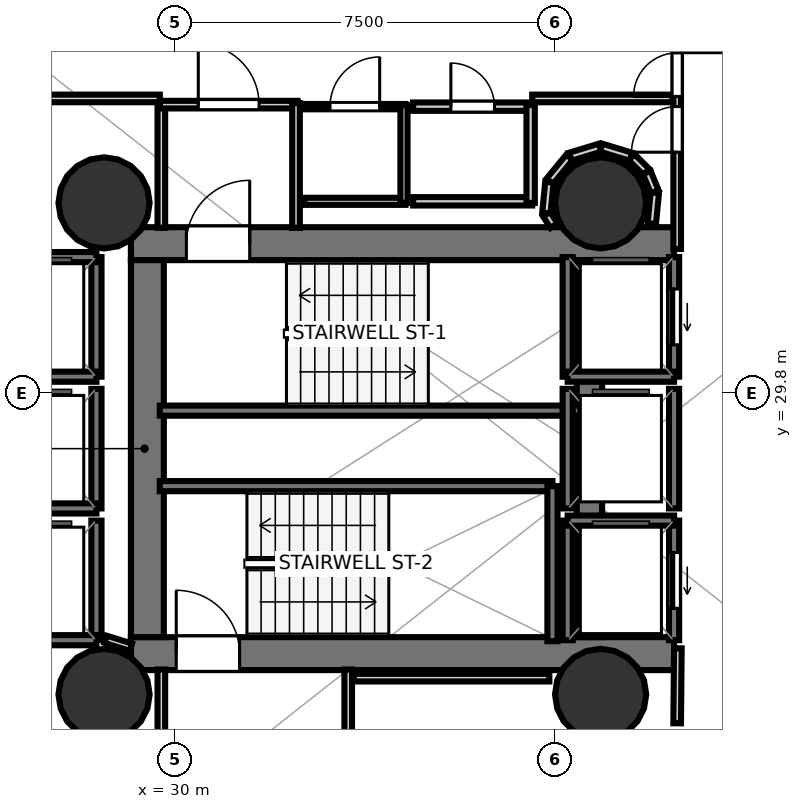
"""IFC4 building model, lengths in metres.
Left out: names, types, materials, properties, quantities, classifications, styles, units other than length and angle.
Written with IfcOpenShell. Run it as: python <this file> out.ifc"""

import sys

from ifc_helpers import new_model, si_unit, direction, frame, frame_2d, origin, origin_2d, place, context, subcontext, project, spatial, rectangle, hollow_circle, extrude, element, fill, save


model = new_model("IFC4")
c1 = context("Model", 3, precision=1e-05, world=origin(), true_north=direction((0.0, 1.0)))
c2 = subcontext(c1, "Body", "Model", "MODEL_VIEW")
j1 = project(units=[si_unit("LENGTHUNIT", "METRE"), si_unit("PLANEANGLEUNIT", "RADIAN")], contexts=[c1])
p1 = place(None, origin())
s1 = spatial("IfcSite", under=j1, at=p1, CompositionType="ELEMENT")
p2 = place(p1, origin())
s2 = spatial("IfcBuilding", under=s1, at=p2, CompositionType="ELEMENT")
p3 = place(p2, frame((0.0, 0.0, 25.7)))
s3 = spatial("IfcBuildingStorey", under=s2, at=p3, CompositionType="ELEMENT", Elevation=25.7)
p4 = place(p3, frame((29.13, 32.745, 0.0), z_axis=(0.0, 0.0, 1.0), x_axis=(1.0, 0.0, 0.0)))
e1 = element("IfcWall", 1, at=p4, inside=s3, PredefinedType="SHEAR", context=c2, shape_type="SweptSolid", body=[
    extrude(rectangle(XDim=10.72, YDim=0.65, at=frame_2d((5.36, 0.0))), origin(), (0.0, 0.0, 1.0), 3.52),
])
p5 = place(p4, frame((1.095, 0.0, 0.0)))
e2 = element("IfcOpeningElement", 2, at=p5, cuts=e1, PredefinedType="OPENING", context=c2, shape_type="SweptSolid", body=[
    extrude(rectangle(XDim=1.25, YDim=2.15, at=frame_2d((0.625, 1.075))), frame((0.0, 0.335, 0.0), z_axis=(0.0, -1.0, 0.0), x_axis=(1.0, 0.0, 0.0)), (0.0, 0.0, 1.0), 0.67),
])
p6 = place(p3, frame((29.13, 24.655, 0.0), z_axis=(0.0, 0.0, 1.0), x_axis=(1.0, 0.0, 0.0)))
e3 = element("IfcWall", 3, at=p6, inside=s3, PredefinedType="SHEAR", context=c2, shape_type="SweptSolid", body=[
    extrude(rectangle(XDim=10.72, YDim=0.65, at=frame_2d((5.36, 0.0))), origin(), (0.0, 0.0, 1.0), 3.52),
])
p7 = place(p6, frame((0.895, 0.0, 0.0)))
e4 = element("IfcOpeningElement", 4, at=p7, cuts=e3, PredefinedType="OPENING", context=c2, shape_type="SweptSolid", body=[
    extrude(rectangle(XDim=1.25, YDim=2.15, at=frame_2d((0.625, 1.075))), frame((0.0, 0.335, 0.0), z_axis=(0.0, -1.0, 0.0), x_axis=(1.0, 0.0, 0.0)), (0.0, 0.0, 1.0), 0.67),
])
p8 = place(p3, frame((29.455, 24.98, 0.0), z_axis=(0.0, 0.0, 1.0), x_axis=(0.0, 1.0, 0.0)))
e5 = element("IfcWall", 5, at=p8, inside=s3, PredefinedType="SHEAR", context=c2, shape_type="SweptSolid", body=[
    extrude(rectangle(XDim=7.44, YDim=0.65, at=frame_2d((3.72, 0.0))), origin(), (0.0, 0.0, 1.0), 3.52),
])
p9 = place(p3, frame((38.18, 24.98, 0.0), z_axis=(0.0, 0.0, 1.0), x_axis=(0.0, 1.0, 0.0)))
e6 = element("IfcWall", 6, at=p9, inside=s3, PredefinedType="SHEAR", context=c2, shape_type="SweptSolid", body=[
    extrude(rectangle(XDim=7.44, YDim=0.5, at=frame_2d((3.72, 0.0))), origin(), (0.0, 0.0, 1.0), 3.52),
])
for number, where, z_axis, x_axis in (
    (7, (28.6, 33.55, 0.0), (0.0, 0.0, 1.0), (1.0, 0.0, 0.0)),
    (8, (28.6, 23.85, 0.0), (0.0, 0.0, 1.0), (1.0, 0.0, 0.0)),
    (9, (38.4, 33.55, 0.0), (0.0, 0.0, 1.0), (1.0, 0.0, 0.0)),
    (10, (38.4, 23.85, 0.0), (0.0, 0.0, 1.0), (1.0, 0.0, 0.0)),
):
    element("IfcColumn", number, at=place(p3, frame(where, z_axis=z_axis, x_axis=x_axis)), inside=s3, PredefinedType="COLUMN", context=c2, shape_type="SweptSolid", body=[
        extrude(hollow_circle(Radius=0.9, WallThickness=0.045, at=origin_2d()), origin(), (0.0, 0.0, 1.0), 3.7),
    ])
p10 = place(p3, frame((29.7, 29.45, 0.0), z_axis=(0.0, 0.0, 1.0), x_axis=(1.0, 0.0, 0.0)))
e11 = element("IfcWall", 11, at=p10, inside=s3, PredefinedType="SOLIDWALL", context=c2, shape_type="SweptSolid", body=[
    extrude(rectangle(XDim=8.3, YDim=0.2, at=frame_2d((4.15, 0.0))), origin(), (0.0, 0.0, 1.0), 3.52),
])
p11 = place(p3, frame((29.7, 27.96, 0.0), z_axis=(0.0, 0.0, 1.0), x_axis=(1.0, 0.0, 0.0)))
e12 = element("IfcWall", 12, at=p11, inside=s3, PredefinedType="SOLIDWALL", context=c2, shape_type="SweptSolid", body=[
    extrude(rectangle(XDim=7.75, YDim=0.2, at=frame_2d((3.875, 0.0))), origin(), (0.0, 0.0, 1.0), 3.52),
])
p12 = place(p3, frame((37.45, 24.9, 0.0), z_axis=(0.0, 0.0, 1.0), x_axis=(0.0, 1.0, 0.0)))
e13 = element("IfcWall", 13, at=p12, inside=s3, PredefinedType="SOLIDWALL", context=c2, shape_type="SweptSolid", body=[
    extrude(rectangle(XDim=3.06, YDim=0.2, at=frame_2d((1.53, 0.0))), origin(), (0.0, 0.0, 1.0), 3.52),
])
p13 = place(p3, frame((39.85, 30.12, 0.0), z_axis=(0.0, 0.0, 1.0), x_axis=(0.0, 1.0, 0.0)))
e14 = element("IfcWall", 14, at=p13, inside=s3, PredefinedType="SOLIDWALL", context=c2, shape_type="SweptSolid", body=[
    extrude(rectangle(XDim=2.36, YDim=0.2, at=frame_2d((1.18, 0.0))), origin(), (0.0, 0.0, 1.0), 3.52),
])
p14 = place(p13, frame((0.63, 0.0, 0.0)))
e15 = element("IfcOpeningElement", 15, at=p14, cuts=e14, PredefinedType="OPENING", context=c2, shape_type="SweptSolid", body=[
    extrude(rectangle(XDim=1.1, YDim=2.15, at=frame_2d((0.55, 1.075))), frame((0.0, 0.11, 0.0), z_axis=(0.0, -1.0, 0.0), x_axis=(1.0, 0.0, 0.0)), (0.0, 0.0, 1.0), 0.22),
])
p15 = place(p3, frame((37.75, 30.12, 0.0), z_axis=(0.0, 0.0, 1.0), x_axis=(0.0, 1.0, 0.0)))
e16 = element("IfcWall", 16, at=p15, inside=s3, PredefinedType="SOLIDWALL", context=c2, shape_type="SweptSolid", body=[
    extrude(rectangle(XDim=2.36, YDim=0.2, at=frame_2d((1.18, 0.0))), origin(), (0.0, 0.0, 1.0), 3.52),
])
p16 = place(p3, frame((37.75, 30.12, 0.0), z_axis=(0.0, 0.0, 1.0), x_axis=(1.0, 0.0, 0.0)))
e17 = element("IfcWall", 17, at=p16, inside=s3, PredefinedType="SOLIDWALL", context=c2, shape_type="SweptSolid", body=[
    extrude(rectangle(XDim=2.1, YDim=0.2, at=frame_2d((1.05, 0.0))), origin(), (0.0, 0.0, 1.0), 3.52),
])
p17 = place(p3, frame((39.85, 24.92, 0.0), z_axis=(0.0, 0.0, 1.0), x_axis=(0.0, 1.0, 0.0)))
e18 = element("IfcWall", 18, at=p17, inside=s3, PredefinedType="SOLIDWALL", context=c2, shape_type="SweptSolid", body=[
    extrude(rectangle(XDim=2.36, YDim=0.2, at=frame_2d((1.18, 0.0))), origin(), (0.0, 0.0, 1.0), 3.52),
])
p18 = place(p17, frame((0.63, 0.0, 0.0)))
e19 = element("IfcOpeningElement", 19, at=p18, cuts=e18, PredefinedType="OPENING", context=c2, shape_type="SweptSolid", body=[
    extrude(rectangle(XDim=1.1, YDim=2.15, at=frame_2d((0.55, 1.075))), frame((0.0, 0.11, 0.0), z_axis=(0.0, -1.0, 0.0), x_axis=(1.0, 0.0, 0.0)), (0.0, 0.0, 1.0), 0.22),
])
p19 = place(p3, frame((37.75, 24.92, 0.0), z_axis=(0.0, 0.0, 1.0), x_axis=(0.0, 1.0, 0.0)))
e20 = element("IfcWall", 20, at=p19, inside=s3, PredefinedType="SOLIDWALL", context=c2, shape_type="SweptSolid", body=[
    extrude(rectangle(XDim=2.36, YDim=0.2, at=frame_2d((1.18, 0.0))), origin(), (0.0, 0.0, 1.0), 3.52),
])
p20 = place(p3, frame((37.75, 27.28, 0.0), z_axis=(0.0, 0.0, 1.0), x_axis=(1.0, 0.0, 0.0)))
e21 = element("IfcWall", 21, at=p20, inside=s3, PredefinedType="SOLIDWALL", context=c2, shape_type="SweptSolid", body=[
    extrude(rectangle(XDim=2.1, YDim=0.2, at=frame_2d((1.05, 0.0))), origin(), (0.0, 0.0, 1.0), 3.52),
])
p21 = place(p3, frame((28.45, 30.12, 0.0), z_axis=(0.0, 0.0, 1.0), x_axis=(0.0, 1.0, 0.0)))
e22 = element("IfcWall", 22, at=p21, inside=s3, PredefinedType="SOLIDWALL", context=c2, shape_type="SweptSolid", body=[
    extrude(rectangle(XDim=2.36, YDim=0.2, at=frame_2d((1.18, 0.0))), origin(), (0.0, 0.0, 1.0), 3.52),
])
for number, where, z_axis, x_axis in (
    (23, (26.35, 32.48, 0.0), (0.0, 0.0, 1.0), (1.0, 0.0, 0.0)),
    (24, (26.35, 30.12, 0.0), (0.0, 0.0, 1.0), (1.0, 0.0, 0.0)),
):
    element("IfcWall", number, at=place(p3, frame(where, z_axis=z_axis, x_axis=x_axis)), inside=s3, PredefinedType="SOLIDWALL", context=c2, shape_type="SweptSolid", body=[
        extrude(rectangle(XDim=2.1, YDim=0.2, at=frame_2d((1.05, 0.0))), origin(), (0.0, 0.0, 1.0), 3.52),
    ])
p22 = place(p3, frame((28.45, 27.52, 0.0), z_axis=(0.0, 0.0, 1.0), x_axis=(0.0, 1.0, 0.0)))
e25 = element("IfcWall", 25, at=p22, inside=s3, PredefinedType="SOLIDWALL", context=c2, shape_type="SweptSolid", body=[
    extrude(rectangle(XDim=2.36, YDim=0.2, at=frame_2d((1.18, 0.0))), origin(), (0.0, 0.0, 1.0), 3.52),
])
p23 = place(p3, frame((26.35, 27.52, 0.0), z_axis=(0.0, 0.0, 1.0), x_axis=(1.0, 0.0, 0.0)))
e26 = element("IfcWall", 26, at=p23, inside=s3, PredefinedType="SOLIDWALL", context=c2, shape_type="SweptSolid", body=[
    extrude(rectangle(XDim=2.1, YDim=0.2, at=frame_2d((1.05, 0.0))), origin(), (0.0, 0.0, 1.0), 3.52),
])
p24 = place(p3, frame((28.45, 24.92, 0.0), z_axis=(0.0, 0.0, 1.0), x_axis=(0.0, 1.0, 0.0)))
e27 = element("IfcWall", 27, at=p24, inside=s3, PredefinedType="SOLIDWALL", context=c2, shape_type="SweptSolid", body=[
    extrude(rectangle(XDim=2.36, YDim=0.2, at=frame_2d((1.18, 0.0))), origin(), (0.0, 0.0, 1.0), 3.52),
])
p25 = place(p3, frame((26.35, 24.92, 0.0), z_axis=(0.0, 0.0, 1.0), x_axis=(1.0, 0.0, 0.0)))
e28 = element("IfcWall", 28, at=p25, inside=s3, PredefinedType="SOLIDWALL", context=c2, shape_type="SweptSolid", body=[
    extrude(rectangle(XDim=2.1, YDim=0.2, at=frame_2d((1.05, 0.0))), origin(), (0.0, 0.0, 1.0), 3.52),
])
for number, where, z_axis, x_axis in (
    (29, (39.85, 27.52, 0.0), (0.0, 0.0, 1.0), (0.0, 1.0, 0.0)),
    (30, (37.75, 27.52, 0.0), (0.0, 0.0, 1.0), (0.0, 1.0, 0.0)),
):
    element("IfcWall", number, at=place(p3, frame(where, z_axis=z_axis, x_axis=x_axis)), inside=s3, PredefinedType="SOLIDWALL", context=c2, shape_type="SweptSolid", body=[
        extrude(rectangle(XDim=2.36, YDim=0.2, at=frame_2d((1.18, 0.0))), origin(), (0.0, 0.0, 1.0), 3.52),
    ])
p26 = place(p3, frame((29.731, 33.058, 0.0), z_axis=(0.0, 0.0, 1.0), x_axis=(0.0, 1.0, 0.0)))
e31 = element("IfcWall", 31, at=p26, inside=s3, PredefinedType="PARTITIONING", context=c2, shape_type="SweptSolid", body=[
    extrude(rectangle(XDim=2.462, YDim=0.15, at=frame_2d((1.231, 0.0))), origin(), (0.0, 0.0, 1.0), 2.84),
])
p27 = place(p3, frame((29.7, 35.489, 0.0), z_axis=(0.0, 0.0, 1.0), x_axis=(1.0, 0.0, 0.0)))
e32 = element("IfcWall", 32, at=p27, inside=s3, PredefinedType="PARTITIONING", context=c2, shape_type="SweptSolid", body=[
    extrude(rectangle(XDim=2.72, YDim=0.15, at=frame_2d((1.36, 0.0))), origin(), (0.0, 0.0, 1.0), 2.84),
])
p28 = place(p27, frame((0.76, 0.0, 0.0)))
e33 = element("IfcOpeningElement", 33, at=p28, cuts=e32, PredefinedType="OPENING", context=c2, shape_type="SweptSolid", body=[
    extrude(rectangle(XDim=1.2, YDim=2.15, at=frame_2d((0.6, 1.075))), frame((0.0, 0.085, 0.0), z_axis=(0.0, -1.0, 0.0), x_axis=(1.0, 0.0, 0.0)), (0.0, 0.0, 1.0), 0.17),
])
p29 = place(p3, frame((32.389, 35.52, 0.0), z_axis=(0.0, 0.0, 1.0), x_axis=(0.0, -1.0, 0.0)))
e34 = element("IfcWall", 34, at=p29, inside=s3, PredefinedType="PARTITIONING", context=c2, shape_type="SweptSolid", body=[
    extrude(rectangle(XDim=2.462, YDim=0.15, at=frame_2d((1.231, 0.0))), origin(), (0.0, 0.0, 1.0), 2.84),
])
for number, where, z_axis, x_axis in (
    (35, (29.731, 21.85, 0.0), (0.0, 0.0, 1.0), (0.0, 1.0, 0.0)),
    (36, (33.419, 24.342, 0.0), (0.0, 0.0, 1.0), (0.0, -1.0, 0.0)),
):
    element("IfcWall", number, at=place(p3, frame(where, z_axis=z_axis, x_axis=x_axis)), inside=s3, PredefinedType="PARTITIONING", context=c2, shape_type="SweptSolid", body=[
        extrude(rectangle(XDim=2.492, YDim=0.15, at=frame_2d((1.246, 0.0))), origin(), (0.0, 0.0, 1.0), 2.84),
    ])
p30 = place(p3, frame((39.911, 32.64, 0.0), z_axis=(0.0, 0.0, 1.0), x_axis=(0.0, 1.0, 0.0)))
e37 = element("IfcWall", 37, at=p30, inside=s3, PredefinedType="PARTITIONING", context=c2, shape_type="SweptSolid", body=[
    extrude(rectangle(XDim=4.01, YDim=0.15, at=frame_2d((2.005, 0.0))), origin(), (0.0, 0.0, 1.0), 2.84),
])
p31 = place(p30, frame((3.01, 0.0, 0.0)))
e38 = element("IfcOpeningElement", 38, at=p31, cuts=e37, PredefinedType="OPENING", context=c2, shape_type="SweptSolid", body=[
    extrude(rectangle(XDim=0.86, YDim=2.05, at=frame_2d((0.43, 1.025))), frame((0.0, 0.085, 0.0), z_axis=(0.0, -1.0, 0.0), x_axis=(1.0, 0.0, 0.0)), (0.0, 0.0, 1.0), 0.17),
])
p32 = place(p30, frame((1.91, 0.0, 0.0)))
e39 = element("IfcOpeningElement", 39, at=p32, cuts=e37, PredefinedType="OPENING", context=c2, shape_type="SweptSolid", body=[
    extrude(rectangle(XDim=0.9, YDim=2.1, at=frame_2d((0.45, 1.05))), frame((0.0, 0.085, 0.0), z_axis=(0.0, -1.0, 0.0), x_axis=(1.0, 0.0, 0.0)), (0.0, 0.0, 1.0), 0.17),
])
p33 = place(p3, frame((39.911, 23.28, 0.0), z_axis=(0.0, 0.0, 1.0), x_axis=(0.009397771291, 0.999955839972, 0.0)))
e40 = element("IfcWall", 40, at=p33, inside=s3, PredefinedType="PARTITIONING", context=c2, shape_type="SweptSolid", body=[
    extrude(rectangle(XDim=1.481, YDim=0.15, at=frame_2d((0.74, 0.0))), origin(), (0.0, 0.0, 1.0), 2.84),
])
p34 = place(p3, frame((34.55, 33.581, 0.0), z_axis=(0.0, 0.0, 1.0), x_axis=(-1.0, 0.0, 0.0)))
e41 = element("IfcWall", 41, at=p34, inside=s3, PredefinedType="PARTITIONING", context=c2, shape_type="SweptSolid", body=[
    extrude(rectangle(XDim=2.0, YDim=0.14, at=frame_2d((1.0, 0.0))), origin(), (0.0, 0.0, 1.0), 2.84),
])
p35 = place(p3, frame((32.55, 35.449, 0.0), z_axis=(0.0, 0.0, 1.0), x_axis=(1.0, 0.0, 0.0)))
e42 = element("IfcWall", 42, at=p35, inside=s3, PredefinedType="PARTITIONING", context=c2, shape_type="SweptSolid", body=[
    extrude(rectangle(XDim=2.0, YDim=0.105, at=frame_2d((1.0, 0.0))), origin(), (0.0, 0.0, 1.0), 2.84),
])
p36 = place(p35, frame((0.51, 0.0, 0.0)))
e43 = element("IfcOpeningElement", 43, at=p36, cuts=e42, PredefinedType="OPENING", context=c2, shape_type="SweptSolid", body=[
    extrude(rectangle(XDim=0.98, YDim=2.1, at=frame_2d((0.49, 1.05))), frame((0.0, 0.062, 0.0), z_axis=(0.0, -1.0, 0.0), x_axis=(1.0, 0.0, 0.0)), (0.0, 0.0, 1.0), 0.125),
])
p37 = place(p3, frame((34.519, 35.48, 0.0), z_axis=(0.0, 0.0, 1.0), x_axis=(0.0, -1.0, 0.0)))
e44 = element("IfcWall", 44, at=p37, inside=s3, PredefinedType="PARTITIONING", context=c2, shape_type="SweptSolid", body=[
    extrude(rectangle(XDim=1.93, YDim=0.14, at=frame_2d((0.965, 0.0))), origin(), (0.0, 0.0, 1.0), 2.84),
])
p38 = place(p3, frame((37.05, 33.581, 0.0), z_axis=(0.0, 0.0, 1.0), x_axis=(-1.0, 0.0, 0.0)))
e45 = element("IfcWall", 45, at=p38, inside=s3, PredefinedType="PLUMBINGWALL", context=c2, shape_type="SweptSolid", body=[
    extrude(rectangle(XDim=2.35, YDim=0.165, at=frame_2d((1.175, 0.0))), origin(), (0.0, 0.0, 1.0), 2.84),
])
p39 = place(p3, frame((34.7, 35.449, 0.0), z_axis=(0.0, 0.0, 1.0), x_axis=(1.0, 0.0, 0.0)))
e46 = element("IfcWall", 46, at=p39, inside=s3, PredefinedType="PLUMBINGWALL", context=c2, shape_type="SweptSolid", body=[
    extrude(rectangle(XDim=2.35, YDim=0.165, at=frame_2d((1.175, 0.0))), origin(), (0.0, 0.0, 1.0), 2.84),
])
p40 = place(p39, frame((0.745, 0.0, 0.0)))
e47 = element("IfcOpeningElement", 47, at=p40, cuts=e46, PredefinedType="OPENING", context=c2, shape_type="SweptSolid", body=[
    extrude(rectangle(XDim=0.86, YDim=2.05, at=frame_2d((0.43, 1.025))), frame((0.0, 0.093, 0.0), z_axis=(0.0, -1.0, 0.0), x_axis=(1.0, 0.0, 0.0)), (0.0, 0.0, 1.0), 0.185),
])
p41 = place(p3, frame((37.019, 35.48, 0.0), z_axis=(0.0, 0.0, 1.0), x_axis=(0.0, -1.0, 0.0)))
e48 = element("IfcWall", 48, at=p41, inside=s3, PredefinedType="PLUMBINGWALL", context=c2, shape_type="SweptSolid", body=[
    extrude(rectangle(XDim=1.93, YDim=0.165, at=frame_2d((0.965, 0.0))), origin(), (0.0, 0.0, 1.0), 2.84),
])
p42 = place(p3, frame((29.13, 24.782, 0.0), z_axis=(0.0, 0.0, 1.0), x_axis=(-0.955000482512, 0.296604245422, 0.0)))
e49 = element("IfcWall", 49, at=p42, inside=s3, PredefinedType="PARTITIONING", context=c2, shape_type="SweptSolid", body=[
    extrude(rectangle(XDim=0.524, YDim=0.15, at=frame_2d((0.262, 0.0))), origin(), (0.0, 0.0, 1.0), 2.84),
])
p43 = place(p3, frame((37.389, 24.181, 0.0), z_axis=(0.0, 0.0, 1.0), x_axis=(-1.0, 0.0, 0.0)))
e50 = element("IfcWall", 50, at=p43, inside=s3, PredefinedType="PARTITIONING", context=c2, shape_type="SweptSolid", body=[
    extrude(rectangle(XDim=3.859, YDim=0.15, at=frame_2d((1.929, 0.0))), origin(), (0.0, 0.0, 1.0), 2.84),
])
p44 = place(p3, frame((39.818, 35.611, 0.0), z_axis=(0.0, 0.0, 1.0), x_axis=(-1.0, 0.0, 0.0)))
e51 = element("IfcWall", 51, at=p44, inside=s3, PredefinedType="PARTITIONING", context=c2, shape_type="SweptSolid", body=[
    extrude(rectangle(XDim=2.768, YDim=0.15, at=frame_2d((1.384, 0.0))), origin(), (0.0, 0.0, 1.0), 2.84),
])
p45 = place(p3, frame((29.7, 35.611, 0.0), z_axis=(0.0, 0.0, 1.0), x_axis=(-1.0, 0.0, 0.0)))
e52 = element("IfcWall", 52, at=p45, inside=s3, PredefinedType="PARTITIONING", context=c2, shape_type="SweptSolid", body=[
    extrude(rectangle(XDim=3.28, YDim=0.15, at=frame_2d((1.64, 0.0))), origin(), (0.0, 0.0, 1.0), 2.798),
])
p46 = place(p3, frame((39.41, 33.141, 0.0), z_axis=(0.0, 0.0, 1.0), x_axis=(0.09797199107, 0.995189172452, 0.0)))
e53 = element("IfcWall", 53, at=p46, inside=s3, PredefinedType="PLUMBINGWALL", context=c2, shape_type="SweptSolid", body=[
    extrude(rectangle(XDim=0.615, YDim=0.165, at=frame_2d((0.308, 0.0))), origin(), (0.0, 0.0, 1.0), 2.84),
])
for number, where, z_axis, x_axis in (
    (54, (39.468, 33.769, 0.0), (0.0, 0.0, 1.0), (-0.383, 0.924, 0.0)),
    (55, (39.303, 34.161, 0.0), (0.0, 0.0, 1.0), (-0.707, 0.707, 0.0)),
):
    element("IfcWall", number, at=place(p3, frame(where, z_axis=z_axis, x_axis=x_axis)), inside=s3, PredefinedType="PLUMBINGWALL", context=c2, shape_type="SweptSolid", body=[
        extrude(rectangle(XDim=0.414, YDim=0.165, at=frame_2d((0.207, 0.0))), origin(), (0.0, 0.0, 1.0), 2.84),
    ])
p47 = place(p3, frame((38.998, 34.461, 0.0), z_axis=(0.0, 0.0, 1.0), x_axis=(-0.956904203315, 0.290403763195, 0.0)))
e56 = element("IfcWall", 56, at=p47, inside=s3, PredefinedType="PLUMBINGWALL", context=c2, shape_type="SweptSolid", body=[
    extrude(rectangle(XDim=0.615, YDim=0.165, at=frame_2d((0.308, 0.0))), origin(), (0.0, 0.0, 1.0), 2.84),
])
p48 = place(p3, frame((38.391, 34.64, 0.0), z_axis=(0.0, 0.0, 1.0), x_axis=(-0.956937641938, -0.290293557355, 0.0)))
e57 = element("IfcWall", 57, at=p48, inside=s3, PredefinedType="PLUMBINGWALL", context=c2, shape_type="SweptSolid", body=[
    extrude(rectangle(XDim=0.616, YDim=0.165, at=frame_2d((0.308, 0.0))), origin(), (0.0, 0.0, 1.0), 2.84),
])
p49 = place(p3, frame((37.787, 34.451, 0.0), z_axis=(0.0, 0.0, 1.0), x_axis=(-0.634468611637, -0.77294862756, 0.0)))
e58 = element("IfcWall", 58, at=p49, inside=s3, PredefinedType="PLUMBINGWALL", context=c2, shape_type="SweptSolid", body=[
    extrude(rectangle(XDim=0.615, YDim=0.165, at=frame_2d((0.308, 0.0))), origin(), (0.0, 0.0, 1.0), 2.84),
])
p50 = place(p3, frame((37.39, 33.959, 0.0), z_axis=(0.0, 0.0, 1.0), x_axis=(-0.09797199107, -0.995189172452, 0.0)))
e59 = element("IfcWall", 59, at=p50, inside=s3, PredefinedType="PLUMBINGWALL", context=c2, shape_type="SweptSolid", body=[
    extrude(rectangle(XDim=0.615, YDim=0.165, at=frame_2d((0.308, 0.0))), origin(), (0.0, 0.0, 1.0), 2.84),
])
p51 = place(p3, frame((37.334, 33.326, 0.0), z_axis=(0.0, 0.0, 1.0), x_axis=(0.544638501186, -0.838670914618, 0.0)))
e60 = element("IfcWall", 60, at=p51, inside=s3, PredefinedType="PLUMBINGWALL", context=c2, shape_type="SweptSolid", body=[
    extrude(rectangle(XDim=0.27, YDim=0.165, at=frame_2d((0.135, 0.0))), origin(), (0.0, 0.0, 1.0), 2.84),
])
p52 = place(p5, origin())
e61 = element("IfcDoor", 61, at=p52, inside=s3, OperationType="SINGLE_SWING_RIGHT", PredefinedType="DOOR", context=c2, shape_type="SweptSolid", body=[
    extrude(rectangle(XDim=1.25, YDim=2.15, at=frame_2d((0.625, 1.075))), frame((0.0, 0.025, 0.0), z_axis=(0.0, -1.0, 0.0), x_axis=(1.0, 0.0, 0.0)), (0.0, 0.0, 1.0), 0.05),
])
fill(e2, e61)
p53 = place(p7, origin())
e62 = element("IfcDoor", 62, at=p53, inside=s3, OperationType="SINGLE_SWING_LEFT", PredefinedType="DOOR", context=c2, shape_type="SweptSolid", body=[
    extrude(rectangle(XDim=1.25, YDim=2.15, at=frame_2d((0.625, 1.075))), frame((0.0, 0.025, 0.0), z_axis=(0.0, -1.0, 0.0), x_axis=(1.0, 0.0, 0.0)), (0.0, 0.0, 1.0), 0.05),
])
fill(e4, e62)
p54 = place(p14, origin())
e63 = element("IfcDoor", 63, at=p54, inside=s3, OperationType="SLIDING_TO_LEFT", PredefinedType="DOOR", context=c2, shape_type="SweptSolid", body=[
    extrude(rectangle(XDim=1.1, YDim=2.15, at=frame_2d((0.55, 1.075))), frame((0.0, 0.025, 0.0), z_axis=(0.0, -1.0, 0.0), x_axis=(1.0, 0.0, 0.0)), (0.0, 0.0, 1.0), 0.05),
])
fill(e15, e63)
p55 = place(p18, origin())
e64 = element("IfcDoor", 64, at=p55, inside=s3, OperationType="SLIDING_TO_LEFT", PredefinedType="DOOR", context=c2, shape_type="SweptSolid", body=[
    extrude(rectangle(XDim=1.1, YDim=2.15, at=frame_2d((0.55, 1.075))), frame((0.0, 0.025, 0.0), z_axis=(0.0, -1.0, 0.0), x_axis=(1.0, 0.0, 0.0)), (0.0, 0.0, 1.0), 0.05),
])
fill(e19, e64)
p56 = place(p28, origin())
e65 = element("IfcDoor", 65, at=p56, inside=s3, OperationType="SINGLE_SWING_LEFT", PredefinedType="DOOR", context=c2, shape_type="SweptSolid", body=[
    extrude(rectangle(XDim=1.2, YDim=2.15, at=frame_2d((0.6, 1.075))), frame((0.0, 0.025, 0.0), z_axis=(0.0, -1.0, 0.0), x_axis=(1.0, 0.0, 0.0)), (0.0, 0.0, 1.0), 0.05),
])
fill(e33, e65)
p57 = place(p31, origin())
e66 = element("IfcDoor", 66, at=p57, inside=s3, OperationType="SINGLE_SWING_LEFT", PredefinedType="DOOR", context=c2, shape_type="SweptSolid", body=[
    extrude(rectangle(XDim=0.86, YDim=2.05, at=frame_2d((0.43, 1.025))), frame((0.0, 0.025, 0.0), z_axis=(0.0, -1.0, 0.0), x_axis=(1.0, 0.0, 0.0)), (0.0, 0.0, 1.0), 0.05),
])
fill(e38, e66)
p58 = place(p36, origin())
e67 = element("IfcDoor", 67, at=p58, inside=s3, OperationType="SINGLE_SWING_RIGHT", PredefinedType="DOOR", context=c2, shape_type="SweptSolid", body=[
    extrude(rectangle(XDim=0.98, YDim=2.1, at=frame_2d((0.49, 1.05))), frame((0.0, 0.025, 0.0), z_axis=(0.0, -1.0, 0.0), x_axis=(1.0, 0.0, 0.0)), (0.0, 0.0, 1.0), 0.05),
])
fill(e43, e67)
p59 = place(p40, origin())
e68 = element("IfcDoor", 68, at=p59, inside=s3, OperationType="SINGLE_SWING_LEFT", PredefinedType="DOOR", context=c2, shape_type="SweptSolid", body=[
    extrude(rectangle(XDim=0.86, YDim=2.05, at=frame_2d((0.43, 1.025))), frame((0.0, 0.025, 0.0), z_axis=(0.0, -1.0, 0.0), x_axis=(1.0, 0.0, 0.0)), (0.0, 0.0, 1.0), 0.05),
])
fill(e47, e68)
p60 = place(p32, origin())
e69 = element("IfcDoor", 69, at=p60, inside=s3, OperationType="SINGLE_SWING_LEFT", PredefinedType="DOOR", context=c2, shape_type="SweptSolid", body=[
    extrude(rectangle(XDim=0.9, YDim=2.1, at=frame_2d((0.45, 1.05))), frame((0.0, 0.025, 0.0), z_axis=(0.0, -1.0, 0.0), x_axis=(1.0, 0.0, 0.0)), (0.0, 0.0, 1.0), 0.05),
])
fill(e39, e69)
save(model, sys.argv[1])
